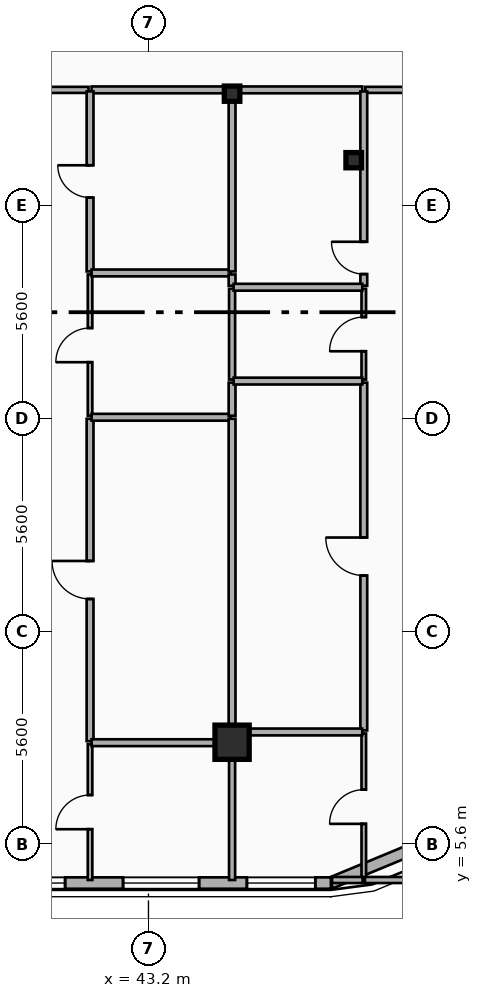
"""IFC4 building model, lengths in metres.
Left out: names, types, materials, properties, quantities, classifications, styles, units other than length and angle.
Written with IfcOpenShell. Run it as: python <this file> out.ifc"""

import sys

from ifc_helpers import new_model, si_unit, direction, frame, frame_2d, origin, origin_2d, place, context, subcontext, project, spatial, rectangle, i_section, extrude, element, fill, save


model = new_model("IFC4")
c1 = context("Model", 3, precision=1e-05, world=origin(), true_north=direction((0.0, 1.0)))
c2 = subcontext(c1, "Body", "Model", "MODEL_VIEW")
j1 = project(units=[si_unit("LENGTHUNIT", "METRE"), si_unit("PLANEANGLEUNIT", "RADIAN")], contexts=[c1])
p1 = place(None, origin())
s1 = spatial("IfcSite", under=j1, at=p1, CompositionType="ELEMENT")
p2 = place(p1, origin())
s2 = spatial("IfcBuilding", under=s1, at=p2, CompositionType="ELEMENT")
p3 = place(p2, frame((0.0, 0.0, 196.8)))
s3 = spatial("IfcBuildingStorey", under=s2, at=p3, CompositionType="ELEMENT", Elevation=196.8)
p4 = place(p3, frame((45.4, 25.35, 0.0), z_axis=(0.0, 0.0, 1.0), x_axis=(1.0, 0.0, 0.0)))
e1 = element("IfcColumn", 1, at=p4, inside=s3, PredefinedType="COLUMN", context=c2, shape_type="SweptSolid", body=[
    extrude(i_section(OverallWidth=0.408, OverallDepth=0.4, WebThickness=0.025, FlangeThickness=0.039, FilletRadius=0.015, at=origin_2d()), origin(), (0.0, 0.0, 1.0), 3.6),
])
p5 = place(p3, frame((45.4, 8.394, 0.0), z_axis=(0.0, -0.090304327479, 0.99591421741), x_axis=(1.0, 0.0, 0.0)))
e2 = element("IfcColumn", 2, at=p5, inside=s3, PredefinedType="COLUMN", context=c2, shape_type="SweptSolid", body=[
    extrude(rectangle(XDim=0.9, YDim=0.9, at=origin_2d()), origin(), (0.0, 0.0, 1.0), 3.615),
])
p6 = place(p3, frame((48.6, 23.6, 0.0), z_axis=(0.0, 0.0, 1.0), x_axis=(1.0, 0.0, 0.0)))
e3 = element("IfcColumn", 3, at=p6, inside=s3, PredefinedType="COLUMN", context=c2, shape_type="SweptSolid", body=[
    extrude(i_section(OverallWidth=0.408, OverallDepth=0.4, WebThickness=0.025, FlangeThickness=0.039, FilletRadius=0.015, at=origin_2d()), origin(), (0.0, 0.0, 1.0), 3.6),
])
p7 = place(p3, frame((50.843, 5.757, 0.0), z_axis=(0.0, 0.0, 1.0), x_axis=(-0.92389884758, -0.382636798336, 0.0)))
e4 = element("IfcWall", 4, at=p7, inside=s3, PredefinedType="SOLIDWALL", context=c2, shape_type="SweptSolid", body=[
    extrude(rectangle(XDim=3.077, YDim=0.3, at=frame_2d((1.538, 0.0))), origin(), (0.0, 0.0, 1.0), 3.34),
])
p8 = place(p3, frame((48.0, 4.58, 0.0), z_axis=(0.0, 0.0, 1.0), x_axis=(-1.0, 0.0, 0.0)))
e5 = element("IfcWall", 5, at=p8, inside=s3, PredefinedType="SOLIDWALL", context=c2, shape_type="SweptSolid", body=[
    extrude(rectangle(XDim=38.4, YDim=0.3, at=frame_2d((19.2, 0.0))), origin(), (0.0, 0.0, 1.0), 3.34),
])
p9 = place(p8, frame((36.19, 0.0, 0.8)))
e6 = element("IfcOpeningElement", 6, at=p9, cuts=e5, PredefinedType="OPENING", context=c2, shape_type="SweptSolid", body=[
    extrude(rectangle(XDim=1.8, YDim=1.8, at=frame_2d((0.9, 0.9))), frame((0.0, 0.16, 0.0), z_axis=(0.0, -1.0, 0.0), x_axis=(1.0, 0.0, 0.0)), (0.0, 0.0, 1.0), 0.32),
])
p10 = place(p8, frame((29.712, 0.0, 0.7)))
e7 = element("IfcOpeningElement", 7, at=p10, cuts=e5, PredefinedType="OPENING", context=c2, shape_type="SweptSolid", body=[
    extrude(rectangle(XDim=2.0, YDim=2.2, at=frame_2d((1.0, 1.1))), frame((0.0, 0.16, 0.0), z_axis=(0.0, -1.0, 0.0), x_axis=(1.0, 0.0, 0.0)), (0.0, 0.0, 1.0), 0.32),
])
p11 = place(p8, frame((33.038, 0.0, 0.7)))
e8 = element("IfcOpeningElement", 8, at=p11, cuts=e5, PredefinedType="OPENING", context=c2, shape_type="SweptSolid", body=[
    extrude(rectangle(XDim=2.0, YDim=2.2, at=frame_2d((1.0, 1.1))), frame((0.0, 0.16, 0.0), z_axis=(0.0, -1.0, 0.0), x_axis=(1.0, 0.0, 0.0)), (0.0, 0.0, 1.0), 0.32),
])
p12 = place(p8, frame((20.0, 0.0, 0.7)))
e9 = element("IfcOpeningElement", 9, at=p12, cuts=e5, PredefinedType="OPENING", context=c2, shape_type="SweptSolid", body=[
    extrude(rectangle(XDim=2.0, YDim=2.2, at=frame_2d((1.0, 1.1))), frame((0.0, 0.16, 0.0), z_axis=(0.0, -1.0, 0.0), x_axis=(1.0, 0.0, 0.0)), (0.0, 0.0, 1.0), 0.32),
])
p13 = place(p8, frame((25.2, 0.0, 0.7)))
e10 = element("IfcOpeningElement", 10, at=p13, cuts=e5, PredefinedType="OPENING", context=c2, shape_type="SweptSolid", body=[
    extrude(rectangle(XDim=2.0, YDim=2.2, at=frame_2d((1.0, 1.1))), frame((0.0, 0.16, 0.0), z_axis=(0.0, -1.0, 0.0), x_axis=(1.0, 0.0, 0.0)), (0.0, 0.0, 1.0), 0.32),
])
p14 = place(p8, frame((13.4, 0.0, 0.7)))
e11 = element("IfcOpeningElement", 11, at=p14, cuts=e5, PredefinedType="OPENING", context=c2, shape_type="SweptSolid", body=[
    extrude(rectangle(XDim=2.0, YDim=2.2, at=frame_2d((1.0, 1.1))), frame((0.0, 0.16, 0.0), z_axis=(0.0, -1.0, 0.0), x_axis=(1.0, 0.0, 0.0)), (0.0, 0.0, 1.0), 0.32),
])
p15 = place(p8, frame((6.993, 0.0, 0.7)))
e12 = element("IfcOpeningElement", 12, at=p15, cuts=e5, PredefinedType="OPENING", context=c2, shape_type="SweptSolid", body=[
    extrude(rectangle(XDim=2.0, YDim=2.2, at=frame_2d((1.0, 1.1))), frame((0.0, 0.16, 0.0), z_axis=(0.0, -1.0, 0.0), x_axis=(1.0, 0.0, 0.0)), (0.0, 0.0, 1.0), 0.32),
])
p16 = place(p8, frame((3.469, 0.0, 0.7)))
e13 = element("IfcOpeningElement", 13, at=p16, cuts=e5, PredefinedType="OPENING", context=c2, shape_type="SweptSolid", body=[
    extrude(rectangle(XDim=2.0, YDim=2.2, at=frame_2d((1.0, 1.1))), frame((0.0, 0.16, 0.0), z_axis=(0.0, -1.0, 0.0), x_axis=(1.0, 0.0, 0.0)), (0.0, 0.0, 1.0), 0.32),
])
p17 = place(p8, frame((0.41, 0.0, 0.8)))
e14 = element("IfcOpeningElement", 14, at=p17, cuts=e5, PredefinedType="OPENING", context=c2, shape_type="SweptSolid", body=[
    extrude(rectangle(XDim=1.8, YDim=1.8, at=frame_2d((0.9, 0.9))), frame((0.0, 0.16, 0.0), z_axis=(0.0, -1.0, 0.0), x_axis=(1.0, 0.0, 0.0)), (0.0, 0.0, 1.0), 0.32),
])
p18 = place(p3, frame((38.39, 25.45, 0.0), z_axis=(0.0, 0.0, 1.0), x_axis=(1.0, 0.0, 0.0)))
e15 = element("IfcWall", 15, at=p18, inside=s3, PredefinedType="PARTITIONING", context=c2, shape_type="SweptSolid", body=[
    extrude(rectangle(XDim=3.233, YDim=0.16, at=frame_2d((1.617, 0.0))), origin(), (0.0, 0.0, 1.0), 3.34),
])
p19 = place(p18, frame((1.116, 0.0, 0.0)))
e16 = element("IfcOpeningElement", 16, at=p19, cuts=e15, PredefinedType="OPENING", context=c2, shape_type="SweptSolid", body=[
    extrude(rectangle(XDim=1.0, YDim=2.15, at=frame_2d((0.5, 1.075))), frame((0.0, 0.09, 0.0), z_axis=(0.0, -1.0, 0.0), x_axis=(1.0, 0.0, 0.0)), (0.0, 0.0, 1.0), 0.18),
])
p20 = place(p3, frame((41.703, 25.45, 0.0), z_axis=(0.0, 0.0, 1.0), x_axis=(1.0, 0.0, 0.0)))
e17 = element("IfcWall", 17, at=p20, inside=s3, PredefinedType="PLUMBINGWALL", context=c2, shape_type="SweptSolid", body=[
    extrude(rectangle(XDim=3.657, YDim=0.18, at=frame_2d((1.829, 0.0))), origin(), (0.0, 0.0, 1.0), 2.42),
])
p21 = place(p3, frame((48.906, 25.45, 0.0), z_axis=(0.0, 0.0, 1.0), x_axis=(1.0, 0.0, 0.0)))
e18 = element("IfcWall", 18, at=p21, inside=s3, PredefinedType="PARTITIONING", context=c2, shape_type="SweptSolid", body=[
    extrude(rectangle(XDim=3.034, YDim=0.16, at=frame_2d((1.517, 0.0))), origin(), (0.0, 0.0, 1.0), 2.67),
])
p22 = place(p21, frame((1.017, 0.0, 0.0)))
e19 = element("IfcOpeningElement", 19, at=p22, cuts=e18, PredefinedType="OPENING", context=c2, shape_type="SweptSolid", body=[
    extrude(rectangle(XDim=1.0, YDim=2.15, at=frame_2d((0.5, 1.075))), frame((0.0, 0.09, 0.0), z_axis=(0.0, -1.0, 0.0), x_axis=(1.0, 0.0, 0.0)), (0.0, 0.0, 1.0), 0.18),
])
p23 = place(p3, frame((45.44, 25.45, 0.0), z_axis=(0.0, 0.0, 1.0), x_axis=(1.0, 0.0, 0.0)))
e20 = element("IfcWall", 20, at=p23, inside=s3, PredefinedType="PLUMBINGWALL", context=c2, shape_type="SweptSolid", body=[
    extrude(rectangle(XDim=3.386, YDim=0.18, at=frame_2d((1.693, 0.0))), origin(), (0.0, 0.0, 1.0), 2.42),
])
p24 = place(p3, frame((41.663, 4.66, 0.0), z_axis=(0.0, 0.0, 1.0), x_axis=(0.0, 1.0, 0.0)))
e21 = element("IfcWall", 21, at=p24, inside=s3, PredefinedType="PARTITIONING", context=c2, shape_type="SweptSolid", body=[
    extrude(rectangle(XDim=3.573, YDim=0.12, at=frame_2d((1.787, 0.0))), origin(), (0.0, 0.0, 1.0), 3.0),
])
p25 = place(p24, frame((1.336, 0.0, 0.0)))
e22 = element("IfcOpeningElement", 22, at=p25, cuts=e21, PredefinedType="OPENING", context=c2, shape_type="SweptSolid", body=[
    extrude(rectangle(XDim=0.9, YDim=2.1, at=frame_2d((0.45, 1.05))), frame((0.0, 0.07, 0.0), z_axis=(0.0, -1.0, 0.0), x_axis=(1.0, 0.0, 0.0)), (0.0, 0.0, 1.0), 0.14),
])
p26 = place(p3, frame((41.663, 8.313, 0.0), z_axis=(0.0, 0.0, 1.0), x_axis=(0.0, 1.0, 0.0)))
e23 = element("IfcWall", 23, at=p26, inside=s3, PredefinedType="PLUMBINGWALL", context=c2, shape_type="SweptSolid", body=[
    extrude(rectangle(XDim=8.483, YDim=0.18, at=frame_2d((4.241, 0.0))), origin(), (0.0, 0.0, 1.0), 2.87),
])
p27 = place(p26, frame((3.741, 0.0, 0.0)))
e24 = element("IfcOpeningElement", 24, at=p27, cuts=e23, PredefinedType="OPENING", context=c2, shape_type="SweptSolid", body=[
    extrude(rectangle(XDim=1.0, YDim=2.15, at=frame_2d((0.5, 1.075))), frame((0.0, 0.1, 0.0), z_axis=(0.0, -1.0, 0.0), x_axis=(1.0, 0.0, 0.0)), (0.0, 0.0, 1.0), 0.2),
])
p28 = place(p3, frame((41.663, 16.876, 0.0), z_axis=(0.0, 0.0, 1.0), x_axis=(0.0, 1.0, 0.0)))
e25 = element("IfcWall", 25, at=p28, inside=s3, PredefinedType="PARTITIONING", context=c2, shape_type="SweptSolid", body=[
    extrude(rectangle(XDim=3.717, YDim=0.12, at=frame_2d((1.858, 0.0))), origin(), (0.0, 0.0, 1.0), 2.87),
])
p29 = place(p28, frame((1.408, 0.0, 0.0)))
e26 = element("IfcOpeningElement", 26, at=p29, cuts=e25, PredefinedType="OPENING", context=c2, shape_type="SweptSolid", body=[
    extrude(rectangle(XDim=0.9, YDim=2.1, at=frame_2d((0.45, 1.05))), frame((0.0, 0.07, 0.0), z_axis=(0.0, -1.0, 0.0), x_axis=(1.0, 0.0, 0.0)), (0.0, 0.0, 1.0), 0.14),
])
p30 = place(p3, frame((41.663, 20.673, 0.0), z_axis=(0.0, 0.0, 1.0), x_axis=(0.0, 1.0, 0.0)))
e27 = element("IfcWall", 27, at=p30, inside=s3, PredefinedType="PLUMBINGWALL", context=c2, shape_type="SweptSolid", body=[
    extrude(rectangle(XDim=4.737, YDim=0.18, at=frame_2d((2.368, 0.0))), origin(), (0.0, 0.0, 1.0), 2.88),
])
p31 = place(p30, frame((1.944, 0.0, 0.0)))
e28 = element("IfcOpeningElement", 28, at=p31, cuts=e27, PredefinedType="OPENING", context=c2, shape_type="SweptSolid", body=[
    extrude(rectangle(XDim=0.85, YDim=2.1, at=frame_2d((0.425, 1.05))), frame((0.0, 0.1, 0.0), z_axis=(0.0, -1.0, 0.0), x_axis=(1.0, 0.0, 0.0)), (0.0, 0.0, 1.0), 0.2),
])
p32 = place(p3, frame((41.703, 8.273, 0.0), z_axis=(0.0, 0.0, 1.0), x_axis=(1.0, 0.0, 0.0)))
e29 = element("IfcWall", 29, at=p32, inside=s3, PredefinedType="PLUMBINGWALL", context=c2, shape_type="SweptSolid", body=[
    extrude(rectangle(XDim=3.657, YDim=0.18, at=frame_2d((1.829, 0.0))), origin(), (0.0, 0.0, 1.0), 2.42),
])
p33 = place(p3, frame((45.4, 4.66, 0.0), z_axis=(0.0, 0.0, 1.0), x_axis=(0.0, 1.0, 0.0)))
e30 = element("IfcWall", 30, at=p33, inside=s3, PredefinedType="PARTITIONING", context=c2, shape_type="SweptSolid", body=[
    extrude(rectangle(XDim=3.573, YDim=0.16, at=frame_2d((1.787, 0.0))), origin(), (0.0, 0.0, 1.0), 2.42),
])
p34 = place(p3, frame((41.703, 16.836, 0.0), z_axis=(0.0, 0.0, 1.0), x_axis=(1.0, 0.0, 0.0)))
e31 = element("IfcWall", 31, at=p34, inside=s3, PredefinedType="PLUMBINGWALL", context=c2, shape_type="SweptSolid", body=[
    extrude(rectangle(XDim=3.657, YDim=0.18, at=frame_2d((1.829, 0.0))), origin(), (0.0, 0.0, 1.0), 2.42),
])
p35 = place(p3, frame((45.4, 8.595, 0.0), z_axis=(0.0, 0.0, 1.0), x_axis=(0.0, 1.0, 0.0)))
e32 = element("IfcWall", 32, at=p35, inside=s3, PredefinedType="PLUMBINGWALL", context=c2, shape_type="SweptSolid", body=[
    extrude(rectangle(XDim=8.201, YDim=0.18, at=frame_2d((4.101, 0.0))), origin(), (0.0, 0.0, 1.0), 2.42),
])
p36 = place(p3, frame((41.703, 20.633, 0.0), z_axis=(0.0, 0.0, 1.0), x_axis=(1.0, 0.0, 0.0)))
e33 = element("IfcWall", 33, at=p36, inside=s3, PredefinedType="PLUMBINGWALL", context=c2, shape_type="SweptSolid", body=[
    extrude(rectangle(XDim=3.657, YDim=0.18, at=frame_2d((1.829, 0.0))), origin(), (0.0, 0.0, 1.0), 2.42),
])
p37 = place(p3, frame((45.4, 16.876, 0.0), z_axis=(0.0, 0.0, 1.0), x_axis=(0.0, 1.0, 0.0)))
e34 = element("IfcWall", 34, at=p37, inside=s3, PredefinedType="PLUMBINGWALL", context=c2, shape_type="SweptSolid", body=[
    extrude(rectangle(XDim=0.872, YDim=0.18, at=frame_2d((0.436, 0.0))), origin(), (0.0, 0.0, 1.0), 2.42),
])
p38 = place(p3, frame((45.4, 17.828, 0.0), z_axis=(0.0, 0.0, 1.0), x_axis=(0.0, 1.0, 0.0)))
e35 = element("IfcWall", 35, at=p38, inside=s3, PredefinedType="PARTITIONING", context=c2, shape_type="SweptSolid", body=[
    extrude(rectangle(XDim=2.389, YDim=0.16, at=frame_2d((1.195, 0.0))), origin(), (0.0, 0.0, 1.0), 2.42),
])
p39 = place(p3, frame((45.4, 20.297, 0.0), z_axis=(0.0, 0.0, 1.0), x_axis=(0.0, 1.0, 0.0)))
e36 = element("IfcWall", 36, at=p39, inside=s3, PredefinedType="PLUMBINGWALL", context=c2, shape_type="SweptSolid", body=[
    extrude(rectangle(XDim=0.296, YDim=0.18, at=frame_2d((0.148, 0.0))), origin(), (0.0, 0.0, 1.0), 2.42),
])
p40 = place(p3, frame((45.4, 20.673, 0.0), z_axis=(0.0, 0.0, 1.0), x_axis=(0.0, 1.0, 0.0)))
e37 = element("IfcWall", 37, at=p40, inside=s3, PredefinedType="PLUMBINGWALL", context=c2, shape_type="SweptSolid", body=[
    extrude(rectangle(XDim=4.737, YDim=0.18, at=frame_2d((2.368, 0.0))), origin(), (0.0, 0.0, 1.0), 2.42),
])
p41 = place(p3, frame((48.866, 4.66, 0.0), z_axis=(0.0, 0.0, 1.0), x_axis=(0.0, 1.0, 0.0)))
e38 = element("IfcWall", 38, at=p41, inside=s3, PredefinedType="PARTITIONING", context=c2, shape_type="SweptSolid", body=[
    extrude(rectangle(XDim=3.855, YDim=0.12, at=frame_2d((1.927, 0.0))), origin(), (0.0, 0.0, 1.0), 3.34),
])
p42 = place(p41, frame((1.478, 0.0, 0.0)))
e39 = element("IfcOpeningElement", 39, at=p42, cuts=e38, PredefinedType="OPENING", context=c2, shape_type="SweptSolid", body=[
    extrude(rectangle(XDim=0.9, YDim=2.1, at=frame_2d((0.45, 1.05))), frame((0.0, 0.07, 0.0), z_axis=(0.0, -1.0, 0.0), x_axis=(1.0, 0.0, 0.0)), (0.0, 0.0, 1.0), 0.14),
])
p43 = place(p3, frame((48.866, 8.595, 0.0), z_axis=(0.0, 0.0, 1.0), x_axis=(0.0, 1.0, 0.0)))
e40 = element("IfcWall", 40, at=p43, inside=s3, PredefinedType="PLUMBINGWALL", context=c2, shape_type="SweptSolid", body=[
    extrude(rectangle(XDim=9.153, YDim=0.18, at=frame_2d((4.577, 0.0))), origin(), (0.0, 0.0, 1.0), 2.82),
])
p44 = place(p43, frame((4.076, 0.0, 0.0)))
e41 = element("IfcOpeningElement", 41, at=p44, cuts=e40, PredefinedType="OPENING", context=c2, shape_type="SweptSolid", body=[
    extrude(rectangle(XDim=1.0, YDim=2.15, at=frame_2d((0.5, 1.075))), frame((0.0, 0.1, 0.0), z_axis=(0.0, -1.0, 0.0), x_axis=(1.0, 0.0, 0.0)), (0.0, 0.0, 1.0), 0.2),
])
p45 = place(p3, frame((48.866, 17.828, 0.0), z_axis=(0.0, 0.0, 1.0), x_axis=(0.0, 1.0, 0.0)))
e42 = element("IfcWall", 42, at=p45, inside=s3, PredefinedType="PARTITIONING", context=c2, shape_type="SweptSolid", body=[
    extrude(rectangle(XDim=2.389, YDim=0.12, at=frame_2d((1.195, 0.0))), origin(), (0.0, 0.0, 1.0), 2.82),
])
p46 = place(p45, frame((0.744, 0.0, 0.0)))
e43 = element("IfcOpeningElement", 43, at=p46, cuts=e42, PredefinedType="OPENING", context=c2, shape_type="SweptSolid", body=[
    extrude(rectangle(XDim=0.9, YDim=2.1, at=frame_2d((0.45, 1.05))), frame((0.0, 0.07, 0.0), z_axis=(0.0, -1.0, 0.0), x_axis=(1.0, 0.0, 0.0)), (0.0, 0.0, 1.0), 0.14),
])
p47 = place(p3, frame((48.866, 20.297, 0.0), z_axis=(0.0, 0.0, 1.0), x_axis=(0.0, 1.0, 0.0)))
e44 = element("IfcWall", 44, at=p47, inside=s3, PredefinedType="PLUMBINGWALL", context=c2, shape_type="SweptSolid", body=[
    extrude(rectangle(XDim=5.113, YDim=0.18, at=frame_2d((2.556, 0.0))), origin(), (0.0, 0.0, 1.0), 2.82),
])
p48 = place(p47, frame((0.306, 0.0, 0.0)))
e45 = element("IfcOpeningElement", 45, at=p48, cuts=e44, PredefinedType="OPENING", context=c2, shape_type="SweptSolid", body=[
    extrude(rectangle(XDim=0.85, YDim=2.1, at=frame_2d((0.425, 1.05))), frame((0.0, 0.1, 0.0), z_axis=(0.0, -1.0, 0.0), x_axis=(1.0, 0.0, 0.0)), (0.0, 0.0, 1.0), 0.2),
])
for number, where, z_axis, x_axis in (
    (46, (45.44, 8.555, 0.0), (0.0, 0.0, 1.0), (1.0, 0.0, 0.0)),
    (47, (45.44, 17.788, 0.0), (0.0, 0.0, 1.0), (1.0, 0.0, 0.0)),
    (48, (45.44, 20.257, 0.0), (0.0, 0.0, 1.0), (1.0, 0.0, 0.0)),
):
    element("IfcWall", number, at=place(p3, frame(where, z_axis=z_axis, x_axis=x_axis)), inside=s3, PredefinedType="PLUMBINGWALL", context=c2, shape_type="SweptSolid", body=[
        extrude(rectangle(XDim=3.386, YDim=0.18, at=frame_2d((1.693, 0.0))), origin(), (0.0, 0.0, 1.0), 2.42),
    ])
p49 = place(p3, frame((48.896, 4.66, 0.0), z_axis=(0.0, 0.0, 1.0), x_axis=(1.0, 0.0, 0.0)))
e49 = element("IfcWall", 49, at=p49, inside=s3, PredefinedType="PARTITIONING", context=c2, shape_type="SweptSolid", body=[
    extrude(rectangle(XDim=3.014, YDim=0.16, at=frame_2d((1.507, 0.0))), origin(), (0.0, 0.0, 1.0), 3.34),
])
p50 = place(p3, frame((48.03, 4.66, 0.0), z_axis=(0.0, 0.0, 1.0), x_axis=(1.0, 0.0, 0.0)))
e50 = element("IfcWall", 50, at=p50, inside=s3, PredefinedType="PARTITIONING", context=c2, shape_type="SweptSolid", body=[
    extrude(rectangle(XDim=0.806, YDim=0.16, at=frame_2d((0.403, 0.0))), origin(), (0.0, 0.0, 1.0), 3.34),
])
p51 = place(p15, origin())
e51 = element("IfcWindow", 51, at=p51, inside=s3, PartitioningType="SINGLE_PANEL", PredefinedType="WINDOW", context=c2, shape_type="SweptSolid", body=[
    extrude(rectangle(XDim=2.0, YDim=2.2, at=frame_2d((1.0, 1.1))), frame((0.0, 0.03, 0.0), z_axis=(0.0, -1.0, 0.0), x_axis=(1.0, 0.0, 0.0)), (0.0, 0.0, 1.0), 0.06),
])
fill(e12, e51)
p52 = place(p16, origin())
e52 = element("IfcWindow", 52, at=p52, inside=s3, PartitioningType="SINGLE_PANEL", PredefinedType="WINDOW", context=c2, shape_type="SweptSolid", body=[
    extrude(rectangle(XDim=2.0, YDim=2.2, at=frame_2d((1.0, 1.1))), frame((0.0, 0.03, 0.0), z_axis=(0.0, -1.0, 0.0), x_axis=(1.0, 0.0, 0.0)), (0.0, 0.0, 1.0), 0.06),
])
fill(e13, e52)
p53 = place(p17, origin())
e53 = element("IfcWindow", 53, at=p53, inside=s3, PartitioningType="SINGLE_PANEL", PredefinedType="WINDOW", context=c2, shape_type="SweptSolid", body=[
    extrude(rectangle(XDim=1.8, YDim=1.8, at=frame_2d((0.9, 0.9))), frame((0.0, 0.03, 0.0), z_axis=(0.0, -1.0, 0.0), x_axis=(1.0, 0.0, 0.0)), (0.0, 0.0, 1.0), 0.06),
])
fill(e14, e53)
p54 = place(p25, origin())
e54 = element("IfcDoor", 54, at=p54, inside=s3, OperationType="SINGLE_SWING_LEFT", PredefinedType="DOOR", context=c2, shape_type="SweptSolid", body=[
    extrude(rectangle(XDim=0.9, YDim=2.1, at=frame_2d((0.45, 1.05))), frame((0.0, 0.025, 0.0), z_axis=(0.0, -1.0, 0.0), x_axis=(1.0, 0.0, 0.0)), (0.0, 0.0, 1.0), 0.05),
])
fill(e22, e54)
p55 = place(p27, origin())
e55 = element("IfcDoor", 55, at=p55, inside=s3, OperationType="SINGLE_SWING_RIGHT", PredefinedType="DOOR", context=c2, shape_type="SweptSolid", body=[
    extrude(rectangle(XDim=1.0, YDim=2.15, at=frame_2d((0.5, 1.075))), frame((0.0, 0.025, 0.0), z_axis=(0.0, -1.0, 0.0), x_axis=(1.0, 0.0, 0.0)), (0.0, 0.0, 1.0), 0.05),
])
fill(e24, e55)
p56 = place(p29, origin())
e56 = element("IfcDoor", 56, at=p56, inside=s3, OperationType="SINGLE_SWING_LEFT", PredefinedType="DOOR", context=c2, shape_type="SweptSolid", body=[
    extrude(rectangle(XDim=0.9, YDim=2.1, at=frame_2d((0.45, 1.05))), frame((0.0, 0.025, 0.0), z_axis=(0.0, -1.0, 0.0), x_axis=(1.0, 0.0, 0.0)), (0.0, 0.0, 1.0), 0.05),
])
fill(e26, e56)
p57 = place(p31, origin())
e57 = element("IfcDoor", 57, at=p57, inside=s3, OperationType="SINGLE_SWING_RIGHT", PredefinedType="DOOR", context=c2, shape_type="SweptSolid", body=[
    extrude(rectangle(XDim=0.85, YDim=2.1, at=frame_2d((0.425, 1.05))), frame((0.0, 0.025, 0.0), z_axis=(0.0, -1.0, 0.0), x_axis=(1.0, 0.0, 0.0)), (0.0, 0.0, 1.0), 0.05),
])
fill(e28, e57)
p58 = place(p42, origin())
e58 = element("IfcDoor", 58, at=p58, inside=s3, OperationType="SINGLE_SWING_LEFT", PredefinedType="DOOR", context=c2, shape_type="SweptSolid", body=[
    extrude(rectangle(XDim=0.9, YDim=2.1, at=frame_2d((0.45, 1.05))), frame((0.0, 0.025, 0.0), z_axis=(0.0, -1.0, 0.0), x_axis=(1.0, 0.0, 0.0)), (0.0, 0.0, 1.0), 0.05),
])
fill(e39, e58)
p59 = place(p44, origin())
e59 = element("IfcDoor", 59, at=p59, inside=s3, OperationType="SINGLE_SWING_RIGHT", PredefinedType="DOOR", context=c2, shape_type="SweptSolid", body=[
    extrude(rectangle(XDim=1.0, YDim=2.15, at=frame_2d((0.5, 1.075))), frame((0.0, 0.025, 0.0), z_axis=(0.0, -1.0, 0.0), x_axis=(1.0, 0.0, 0.0)), (0.0, 0.0, 1.0), 0.05),
])
fill(e41, e59)
p60 = place(p46, origin())
e60 = element("IfcDoor", 60, at=p60, inside=s3, OperationType="SINGLE_SWING_LEFT", PredefinedType="DOOR", context=c2, shape_type="SweptSolid", body=[
    extrude(rectangle(XDim=0.9, YDim=2.1, at=frame_2d((0.45, 1.05))), frame((0.0, 0.025, 0.0), z_axis=(0.0, -1.0, 0.0), x_axis=(1.0, 0.0, 0.0)), (0.0, 0.0, 1.0), 0.05),
])
fill(e43, e60)
p61 = place(p48, origin())
e61 = element("IfcDoor", 61, at=p61, inside=s3, OperationType="SINGLE_SWING_RIGHT", PredefinedType="DOOR", context=c2, shape_type="SweptSolid", body=[
    extrude(rectangle(XDim=0.85, YDim=2.1, at=frame_2d((0.425, 1.05))), frame((0.0, 0.025, 0.0), z_axis=(0.0, -1.0, 0.0), x_axis=(1.0, 0.0, 0.0)), (0.0, 0.0, 1.0), 0.05),
])
fill(e45, e61)
save(model, sys.argv[1])
